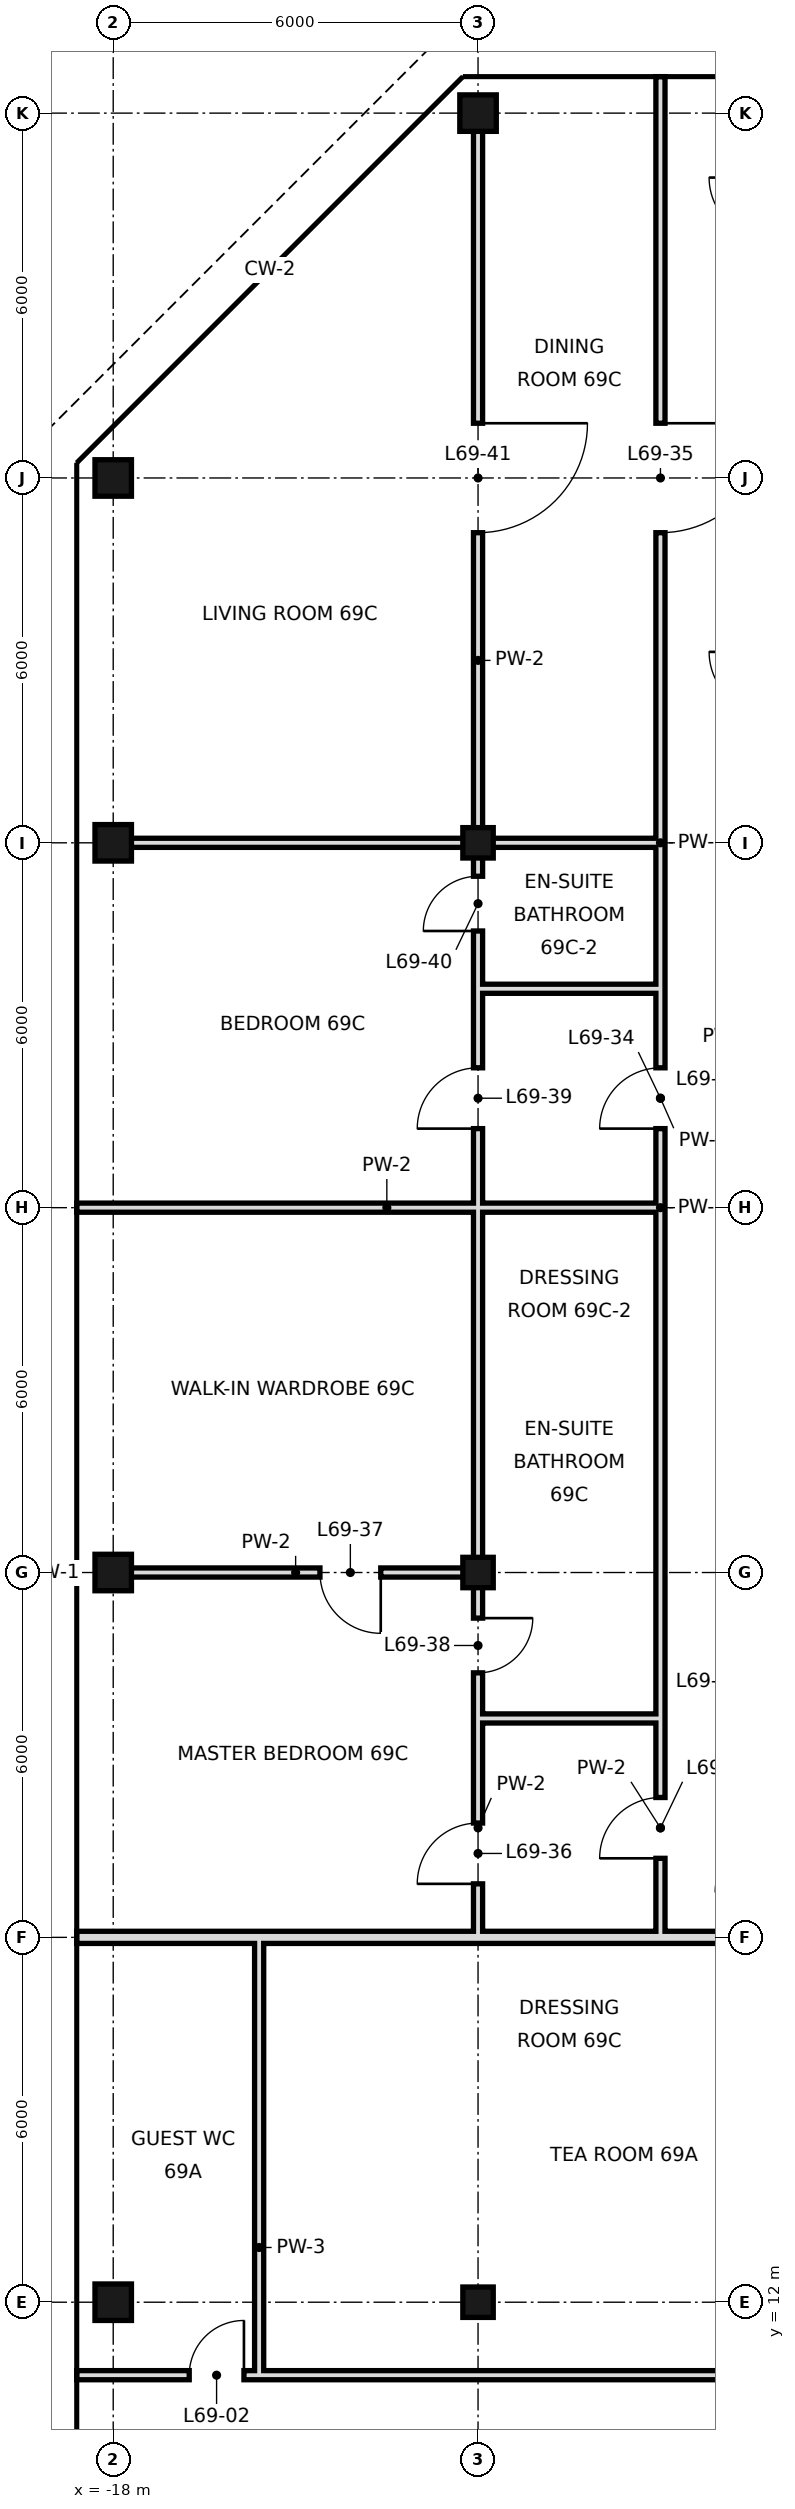
"""IFC4 building model, lengths in metres.
Left out: names, types, materials, properties, quantities, classifications, styles, units other than length and angle.
Written with IfcOpenShell. Run it as: python <this file> out.ifc"""

import sys

from ifc_helpers import new_model, si_unit, direction, frame, frame_2d, origin, origin_2d, place, context, subcontext, project, spatial, rectangle, hollow_rectangle, extrude, element, fill, save


model = new_model("IFC4")
c1 = context("Model", 3, precision=1e-05, world=origin(), true_north=direction((0.0, 1.0)))
c2 = subcontext(c1, "Body", "Model", "MODEL_VIEW")
j1 = project(units=[si_unit("LENGTHUNIT", "METRE"), si_unit("PLANEANGLEUNIT", "RADIAN")], contexts=[c1])
p1 = place(None, origin())
s1 = spatial("IfcSite", under=j1, at=p1, CompositionType="ELEMENT")
p2 = place(p1, origin())
s2 = spatial("IfcBuilding", under=s1, at=p2, CompositionType="ELEMENT")
p3 = place(p2, frame((0.0, 0.0, 294.4)))
s3 = spatial("IfcBuildingStorey", under=s2, at=p3, CompositionType="ELEMENT", Elevation=294.4)
for number, where, z_axis, x_axis in (
    (1, (-18.0, 12.0, 0.0), (0.0, 0.0, 1.0), (1.0, 0.0, 0.0)),
    (2, (-18.0, 24.0, 0.0), (0.0, 0.0, 1.0), (1.0, 0.0, 0.0)),
    (3, (-18.0, 36.0, 0.0), (0.0, 0.0, 1.0), (1.0, 0.0, 0.0)),
    (4, (-18.0, 42.0, 0.0), (0.0, 0.0, 1.0), (1.0, 0.0, 0.0)),
):
    element("IfcColumn", number, at=place(p3, frame(where, z_axis=z_axis, x_axis=x_axis)), inside=s3, PredefinedType="COLUMN", context=c2, shape_type="SweptSolid", body=[
        extrude(hollow_rectangle(XDim=0.6, YDim=0.6, WallThickness=0.028, at=origin_2d()), origin(), (0.0, 0.0, 1.0), 3.6),
    ])
for number, where, z_axis, x_axis in (
    (5, (-12.0, 12.0, 0.0), (0.0, 0.0, 1.0), (1.0, 0.0, 0.0)),
    (6, (-12.0, 24.0, 0.0), (0.0, 0.0, 1.0), (1.0, 0.0, 0.0)),
    (7, (-12.0, 36.0, 0.0), (0.0, 0.0, 1.0), (1.0, 0.0, 0.0)),
):
    element("IfcColumn", number, at=place(p3, frame(where, z_axis=z_axis, x_axis=x_axis)), inside=s3, PredefinedType="COLUMN", context=c2, shape_type="SweptSolid", body=[
        extrude(hollow_rectangle(XDim=0.5, YDim=0.5, WallThickness=0.025, at=origin_2d()), origin(), (0.0, 0.0, 1.0), 3.6),
    ])
p4 = place(p3, frame((-12.0, 48.0, 0.0), z_axis=(0.0, 0.0, 1.0), x_axis=(1.0, 0.0, 0.0)))
e8 = element("IfcColumn", 8, at=p4, inside=s3, PredefinedType="COLUMN", context=c2, shape_type="SweptSolid", body=[
    extrude(hollow_rectangle(XDim=0.6, YDim=0.6, WallThickness=0.028, at=origin_2d()), origin(), (0.0, 0.0, 1.0), 3.6),
])
p5 = place(p3, frame((-12.0, 18.0, 0.0), z_axis=(0.0, 0.0, 1.0), x_axis=(0.0, 1.0, 0.0)))
e9 = element("IfcWall", 9, at=p5, inside=s3, PredefinedType="PARTITIONING", context=c2, shape_type="SweptSolid", body=[
    extrude(rectangle(XDim=3.6, YDim=0.15, at=frame_2d((1.8, 0.0))), origin(), (0.0, 0.0, 1.0), 2.72),
])
p6 = place(p5, frame((0.88, 0.0, 0.0)))
e10 = element("IfcOpeningElement", 10, at=p6, cuts=e9, PredefinedType="OPENING", context=c2, shape_type="SweptSolid", body=[
    extrude(rectangle(XDim=1.0, YDim=2.4, at=frame_2d((0.5, 1.2))), frame((0.0, 0.085, 0.0), z_axis=(0.0, -1.0, 0.0), x_axis=(1.0, 0.0, 0.0)), (0.0, 0.0, 1.0), 0.17),
])
p7 = place(p3, frame((-12.0, 30.0, 0.0), z_axis=(0.0, 0.0, 1.0), x_axis=(0.0, 1.0, 0.0)))
e11 = element("IfcWall", 11, at=p7, inside=s3, PredefinedType="PARTITIONING", context=c2, shape_type="SweptSolid", body=[
    extrude(rectangle(XDim=3.6, YDim=0.15, at=frame_2d((1.8, 0.0))), origin(), (0.0, 0.0, 1.0), 2.72),
])
p8 = place(p7, frame((1.3, 0.0, 0.0)))
e12 = element("IfcOpeningElement", 12, at=p8, cuts=e11, PredefinedType="OPENING", context=c2, shape_type="SweptSolid", body=[
    extrude(rectangle(XDim=1.0, YDim=2.4, at=frame_2d((0.5, 1.2))), frame((0.0, 0.085, 0.0), z_axis=(0.0, -1.0, 0.0), x_axis=(1.0, 0.0, 0.0)), (0.0, 0.0, 1.0), 0.17),
])
p9 = place(p3, frame((-12.0, 36.0, 0.0), z_axis=(0.0, 0.0, 1.0), x_axis=(0.0, 1.0, 0.0)))
e13 = element("IfcWall", 13, at=p9, inside=s3, PredefinedType="PARTITIONING", context=c2, shape_type="SweptSolid", body=[
    extrude(rectangle(XDim=12.0, YDim=0.15, at=frame_2d((6.0, 0.0))), origin(), (0.0, 0.0, 1.0), 2.72),
])
p10 = place(p9, frame((5.1, 0.0, 0.0)))
e14 = element("IfcOpeningElement", 14, at=p10, cuts=e13, PredefinedType="OPENING", context=c2, shape_type="SweptSolid", body=[
    extrude(rectangle(XDim=1.8, YDim=2.4, at=frame_2d((0.9, 1.2))), frame((0.0, 0.085, 0.0), z_axis=(0.0, -1.0, 0.0), x_axis=(1.0, 0.0, 0.0)), (0.0, 0.0, 1.0), 0.17),
])
p11 = place(p3, frame((-12.0, 21.6, 0.0), z_axis=(0.0, 0.0, 1.0), x_axis=(0.0, 1.0, 0.0)))
e15 = element("IfcWall", 15, at=p11, inside=s3, PredefinedType="PARTITIONING", context=c2, shape_type="SweptSolid", body=[
    extrude(rectangle(XDim=8.4, YDim=0.15, at=frame_2d((4.2, 0.0))), origin(), (0.0, 0.0, 1.0), 2.72),
])
p12 = place(p11, frame((0.75, 0.0, 0.0)))
e16 = element("IfcOpeningElement", 16, at=p12, cuts=e15, PredefinedType="OPENING", context=c2, shape_type="SweptSolid", body=[
    extrude(rectangle(XDim=0.9, YDim=2.4, at=frame_2d((0.45, 1.2))), frame((0.0, 0.085, 0.0), z_axis=(0.0, -1.0, 0.0), x_axis=(1.0, 0.0, 0.0)), (0.0, 0.0, 1.0), 0.17),
])
p13 = place(p3, frame((-12.0, 33.6, 0.0), z_axis=(0.0, 0.0, 1.0), x_axis=(0.0, 1.0, 0.0)))
e17 = element("IfcWall", 17, at=p13, inside=s3, PredefinedType="PARTITIONING", context=c2, shape_type="SweptSolid", body=[
    extrude(rectangle(XDim=2.4, YDim=0.15, at=frame_2d((1.2, 0.0))), origin(), (0.0, 0.0, 1.0), 2.72),
])
p14 = place(p13, frame((0.95, 0.0, 0.0)))
e18 = element("IfcOpeningElement", 18, at=p14, cuts=e17, PredefinedType="OPENING", context=c2, shape_type="SweptSolid", body=[
    extrude(rectangle(XDim=0.9, YDim=2.4, at=frame_2d((0.45, 1.2))), frame((0.0, 0.085, 0.0), z_axis=(0.0, -1.0, 0.0), x_axis=(1.0, 0.0, 0.0)), (0.0, 0.0, 1.0), 0.17),
])
p15 = place(p3, frame((-15.6, 10.8, 0.0), z_axis=(0.0, 0.0, 1.0), x_axis=(0.0, 1.0, 0.0)))
e19 = element("IfcWall", 19, at=p15, inside=s3, PredefinedType="PARTITIONING", context=c2, shape_type="SweptSolid", body=[
    extrude(rectangle(XDim=7.2, YDim=0.15, at=frame_2d((3.6, 0.0))), origin(), (0.0, 0.0, 1.0), 3.42),
])
p16 = place(p3, frame((-9.0, 18.0, 0.0), z_axis=(0.0, 0.0, 1.0), x_axis=(0.0, 1.0, 0.0)))
e20 = element("IfcWall", 20, at=p16, inside=s3, PredefinedType="PARTITIONING", context=c2, shape_type="SweptSolid", body=[
    extrude(rectangle(XDim=3.6, YDim=0.15, at=frame_2d((1.8, 0.0))), origin(), (0.0, 0.0, 1.0), 3.42),
])
p17 = place(p16, frame((1.3, 0.0, 0.0)))
e21 = element("IfcOpeningElement", 21, at=p17, cuts=e20, PredefinedType="OPENING", context=c2, shape_type="SweptSolid", body=[
    extrude(rectangle(XDim=1.0, YDim=2.4, at=frame_2d((0.5, 1.2))), frame((0.0, 0.085, 0.0), z_axis=(0.0, -1.0, 0.0), x_axis=(1.0, 0.0, 0.0)), (0.0, 0.0, 1.0), 0.17),
])
p18 = place(p3, frame((-9.0, 30.0, 0.0), z_axis=(0.0, 0.0, 1.0), x_axis=(0.0, 1.0, 0.0)))
e22 = element("IfcWall", 22, at=p18, inside=s3, PredefinedType="PARTITIONING", context=c2, shape_type="SweptSolid", body=[
    extrude(rectangle(XDim=3.6, YDim=0.15, at=frame_2d((1.8, 0.0))), origin(), (0.0, 0.0, 1.0), 3.42),
])
p19 = place(p18, frame((1.3, 0.0, 0.0)))
e23 = element("IfcOpeningElement", 23, at=p19, cuts=e22, PredefinedType="OPENING", context=c2, shape_type="SweptSolid", body=[
    extrude(rectangle(XDim=1.0, YDim=2.4, at=frame_2d((0.5, 1.2))), frame((0.0, 0.085, 0.0), z_axis=(0.0, -1.0, 0.0), x_axis=(1.0, 0.0, 0.0)), (0.0, 0.0, 1.0), 0.17),
])
p20 = place(p3, frame((-9.0, 36.0, 0.0), z_axis=(0.0, 0.0, 1.0), x_axis=(0.0, 1.0, 0.0)))
e24 = element("IfcWall", 24, at=p20, inside=s3, PredefinedType="PARTITIONING", context=c2, shape_type="SweptSolid", body=[
    extrude(rectangle(XDim=12.6, YDim=0.15, at=frame_2d((6.3, 0.0))), origin(), (0.0, 0.0, 1.0), 3.42),
])
p21 = place(p20, frame((5.1, 0.0, 0.0)))
e25 = element("IfcOpeningElement", 25, at=p21, cuts=e24, PredefinedType="OPENING", context=c2, shape_type="SweptSolid", body=[
    extrude(rectangle(XDim=1.8, YDim=2.4, at=frame_2d((0.9, 1.2))), frame((0.0, 0.085, 0.0), z_axis=(0.0, -1.0, 0.0), x_axis=(1.0, 0.0, 0.0)), (0.0, 0.0, 1.0), 0.17),
])
p22 = place(p3, frame((-9.0, 21.6, 0.0), z_axis=(0.0, 0.0, 1.0), x_axis=(0.0, 1.0, 0.0)))
e26 = element("IfcWall", 26, at=p22, inside=s3, PredefinedType="PARTITIONING", context=c2, shape_type="SweptSolid", body=[
    extrude(rectangle(XDim=8.4, YDim=0.15, at=frame_2d((4.2, 0.0))), origin(), (0.0, 0.0, 1.0), 3.42),
])
p23 = place(p3, frame((-9.0, 33.6, 0.0), z_axis=(0.0, 0.0, 1.0), x_axis=(0.0, 1.0, 0.0)))
e27 = element("IfcWall", 27, at=p23, inside=s3, PredefinedType="PARTITIONING", context=c2, shape_type="SweptSolid", body=[
    extrude(rectangle(XDim=2.4, YDim=0.15, at=frame_2d((1.2, 0.0))), origin(), (0.0, 0.0, 1.0), 3.42),
])
p24 = place(p3, frame((-15.6, 10.8, 0.0), z_axis=(0.0, 0.0, 1.0), x_axis=(1.0, 0.0, 0.0)))
e28 = element("IfcWall", 28, at=p24, inside=s3, PredefinedType="PARTITIONING", context=c2, shape_type="SweptSolid", body=[
    extrude(rectangle(XDim=23.4, YDim=0.15, at=frame_2d((11.7, 0.0))), origin(), (0.0, 0.0, 1.0), 3.42),
])
p25 = place(p24, frame((10.75, 0.0, 0.0)))
e29 = element("IfcOpeningElement", 29, at=p25, cuts=e28, PredefinedType="OPENING", context=c2, shape_type="SweptSolid", body=[
    extrude(rectangle(XDim=1.0, YDim=2.4, at=frame_2d((0.5, 1.2))), frame((0.0, 0.085, 0.0), z_axis=(0.0, -1.0, 0.0), x_axis=(1.0, 0.0, 0.0)), (0.0, 0.0, 1.0), 0.17),
])
p26 = place(p24, frame((17.2, 0.0, 0.0)))
e30 = element("IfcOpeningElement", 30, at=p26, cuts=e28, PredefinedType="OPENING", context=c2, shape_type="SweptSolid", body=[
    extrude(rectangle(XDim=1.0, YDim=2.4, at=frame_2d((0.5, 1.2))), frame((0.0, 0.085, 0.0), z_axis=(0.0, -1.0, 0.0), x_axis=(1.0, 0.0, 0.0)), (0.0, 0.0, 1.0), 0.17),
])
p27 = place(p3, frame((-18.6, 10.8, 0.0), z_axis=(0.0, 0.0, 1.0), x_axis=(1.0, 0.0, 0.0)))
e31 = element("IfcWall", 31, at=p27, inside=s3, PredefinedType="PARTITIONING", context=c2, shape_type="SweptSolid", body=[
    extrude(rectangle(XDim=3.0, YDim=0.15, at=frame_2d((1.5, 0.0))), origin(), (0.0, 0.0, 1.0), 3.42),
])
p28 = place(p27, frame((1.85, 0.0, 0.0)))
e32 = element("IfcOpeningElement", 32, at=p28, cuts=e31, PredefinedType="OPENING", context=c2, shape_type="SweptSolid", body=[
    extrude(rectangle(XDim=0.9, YDim=2.4, at=frame_2d((0.45, 1.2))), frame((0.0, 0.085, 0.0), z_axis=(0.0, -1.0, 0.0), x_axis=(1.0, 0.0, 0.0)), (0.0, 0.0, 1.0), 0.17),
])
p29 = place(p3, frame((-18.6, 18.0, 0.0), z_axis=(0.0, 0.0, 1.0), x_axis=(1.0, 0.0, 0.0)))
e33 = element("IfcWall", 33, at=p29, inside=s3, PredefinedType="SOLIDWALL", context=c2, shape_type="SweptSolid", body=[
    extrude(rectangle(XDim=21.7, YDim=0.2, at=frame_2d((10.85, 0.0))), origin(), (0.0, 0.0, 1.0), 2.72),
])
p30 = place(p3, frame((-12.0, 21.6, 0.0), z_axis=(0.0, 0.0, 1.0), x_axis=(1.0, 0.0, 0.0)))
e34 = element("IfcWall", 34, at=p30, inside=s3, PredefinedType="PARTITIONING", context=c2, shape_type="SweptSolid", body=[
    extrude(rectangle(XDim=3.0, YDim=0.15, at=frame_2d((1.5, 0.0))), origin(), (0.0, 0.0, 1.0), 3.42),
])
p31 = place(p3, frame((-18.0, 24.0, 0.0), z_axis=(0.0, 0.0, 1.0), x_axis=(1.0, 0.0, 0.0)))
e35 = element("IfcWall", 35, at=p31, inside=s3, PredefinedType="PARTITIONING", context=c2, shape_type="SweptSolid", body=[
    extrude(rectangle(XDim=6.0, YDim=0.15, at=frame_2d((3.0, 0.0))), origin(), (0.0, 0.0, 1.0), 2.97),
])
p32 = place(p31, frame((3.4, 0.0, 0.0)))
e36 = element("IfcOpeningElement", 36, at=p32, cuts=e35, PredefinedType="OPENING", context=c2, shape_type="SweptSolid", body=[
    extrude(rectangle(XDim=1.0, YDim=2.4, at=frame_2d((0.5, 1.2))), frame((0.0, 0.085, 0.0), z_axis=(0.0, -1.0, 0.0), x_axis=(1.0, 0.0, 0.0)), (0.0, 0.0, 1.0), 0.17),
])
p33 = place(p3, frame((-18.6, 30.0, 0.0), z_axis=(0.0, 0.0, 1.0), x_axis=(1.0, 0.0, 0.0)))
e37 = element("IfcWall", 37, at=p33, inside=s3, PredefinedType="PARTITIONING", context=c2, shape_type="SweptSolid", body=[
    extrude(rectangle(XDim=6.6, YDim=0.15, at=frame_2d((3.3, 0.0))), origin(), (0.0, 0.0, 1.0), 2.97),
])
p34 = place(p3, frame((-12.0, 30.0, 0.0), z_axis=(0.0, 0.0, 1.0), x_axis=(1.0, 0.0, 0.0)))
e38 = element("IfcWall", 38, at=p34, inside=s3, PredefinedType="PARTITIONING", context=c2, shape_type="SweptSolid", body=[
    extrude(rectangle(XDim=3.0, YDim=0.15, at=frame_2d((1.5, 0.0))), origin(), (0.0, 0.0, 1.0), 2.72),
])
p35 = place(p3, frame((-12.0, 33.6, 0.0), z_axis=(0.0, 0.0, 1.0), x_axis=(1.0, 0.0, 0.0)))
e39 = element("IfcWall", 39, at=p35, inside=s3, PredefinedType="PARTITIONING", context=c2, shape_type="SweptSolid", body=[
    extrude(rectangle(XDim=3.0, YDim=0.15, at=frame_2d((1.5, 0.0))), origin(), (0.0, 0.0, 1.0), 3.42),
])
p36 = place(p3, frame((-18.0, 36.0, 0.0), z_axis=(0.0, 0.0, 1.0), x_axis=(1.0, 0.0, 0.0)))
e40 = element("IfcWall", 40, at=p36, inside=s3, PredefinedType="PARTITIONING", context=c2, shape_type="SweptSolid", body=[
    extrude(rectangle(XDim=6.0, YDim=0.15, at=frame_2d((3.0, 0.0))), origin(), (0.0, 0.0, 1.0), 2.97),
])
p37 = place(p3, frame((-12.0, 36.0, 0.0), z_axis=(0.0, 0.0, 1.0), x_axis=(1.0, 0.0, 0.0)))
e41 = element("IfcWall", 41, at=p37, inside=s3, PredefinedType="PARTITIONING", context=c2, shape_type="SweptSolid", body=[
    extrude(rectangle(XDim=3.0, YDim=0.15, at=frame_2d((1.5, 0.0))), origin(), (0.0, 0.0, 1.0), 2.72),
])
p38 = place(p28, frame((0.9, 0.0, 0.0), z_axis=(0.0, 0.0, 1.0), x_axis=(-1.0, 0.0, 0.0)))
e42 = element("IfcDoor", 42, at=p38, inside=s3, OperationType="SINGLE_SWING_LEFT", PredefinedType="DOOR", context=c2, shape_type="SweptSolid", body=[
    extrude(rectangle(XDim=0.9, YDim=2.4, at=frame_2d((0.45, 1.2))), frame((0.0, 0.025, 0.0), z_axis=(0.0, -1.0, 0.0), x_axis=(1.0, 0.0, 0.0)), (0.0, 0.0, 1.0), 0.05),
])
fill(e32, e42)
p39 = place(p17, origin())
e43 = element("IfcDoor", 43, at=p39, inside=s3, OperationType="SINGLE_SWING_LEFT", PredefinedType="DOOR", context=c2, shape_type="SweptSolid", body=[
    extrude(rectangle(XDim=1.0, YDim=2.4, at=frame_2d((0.5, 1.2))), frame((0.0, 0.025, 0.0), z_axis=(0.0, -1.0, 0.0), x_axis=(1.0, 0.0, 0.0)), (0.0, 0.0, 1.0), 0.05),
])
fill(e21, e43)
p40 = place(p19, origin())
e44 = element("IfcDoor", 44, at=p40, inside=s3, OperationType="SINGLE_SWING_LEFT", PredefinedType="DOOR", context=c2, shape_type="SweptSolid", body=[
    extrude(rectangle(XDim=1.0, YDim=2.4, at=frame_2d((0.5, 1.2))), frame((0.0, 0.025, 0.0), z_axis=(0.0, -1.0, 0.0), x_axis=(1.0, 0.0, 0.0)), (0.0, 0.0, 1.0), 0.05),
])
fill(e23, e44)
p41 = place(p21, origin())
e45 = element("IfcDoor", 45, at=p41, inside=s3, OperationType="SINGLE_SWING_RIGHT", PredefinedType="DOOR", context=c2, shape_type="SweptSolid", body=[
    extrude(rectangle(XDim=1.8, YDim=2.4, at=frame_2d((0.9, 1.2))), frame((0.0, 0.025, 0.0), z_axis=(0.0, -1.0, 0.0), x_axis=(1.0, 0.0, 0.0)), (0.0, 0.0, 1.0), 0.05),
])
fill(e25, e45)
p42 = place(p6, origin())
e46 = element("IfcDoor", 46, at=p42, inside=s3, OperationType="SINGLE_SWING_LEFT", PredefinedType="DOOR", context=c2, shape_type="SweptSolid", body=[
    extrude(rectangle(XDim=1.0, YDim=2.4, at=frame_2d((0.5, 1.2))), frame((0.0, 0.025, 0.0), z_axis=(0.0, -1.0, 0.0), x_axis=(1.0, 0.0, 0.0)), (0.0, 0.0, 1.0), 0.05),
])
fill(e10, e46)
p43 = place(p32, origin())
e47 = element("IfcDoor", 47, at=p43, inside=s3, OperationType="SINGLE_SWING_RIGHT", PredefinedType="DOOR", context=c2, shape_type="SweptSolid", body=[
    extrude(rectangle(XDim=1.0, YDim=2.4, at=frame_2d((0.5, 1.2))), frame((0.0, 0.025, 0.0), z_axis=(0.0, -1.0, 0.0), x_axis=(1.0, 0.0, 0.0)), (0.0, 0.0, 1.0), 0.05),
])
fill(e36, e47)
p44 = place(p12, origin())
e48 = element("IfcDoor", 48, at=p44, inside=s3, OperationType="SINGLE_SWING_RIGHT", PredefinedType="DOOR", context=c2, shape_type="SweptSolid", body=[
    extrude(rectangle(XDim=0.9, YDim=2.4, at=frame_2d((0.45, 1.2))), frame((0.0, 0.025, 0.0), z_axis=(0.0, -1.0, 0.0), x_axis=(1.0, 0.0, 0.0)), (0.0, 0.0, 1.0), 0.05),
])
fill(e16, e48)
p45 = place(p8, origin())
e49 = element("IfcDoor", 49, at=p45, inside=s3, OperationType="SINGLE_SWING_LEFT", PredefinedType="DOOR", context=c2, shape_type="SweptSolid", body=[
    extrude(rectangle(XDim=1.0, YDim=2.4, at=frame_2d((0.5, 1.2))), frame((0.0, 0.025, 0.0), z_axis=(0.0, -1.0, 0.0), x_axis=(1.0, 0.0, 0.0)), (0.0, 0.0, 1.0), 0.05),
])
fill(e12, e49)
p46 = place(p14, origin())
e50 = element("IfcDoor", 50, at=p46, inside=s3, OperationType="SINGLE_SWING_LEFT", PredefinedType="DOOR", context=c2, shape_type="SweptSolid", body=[
    extrude(rectangle(XDim=0.9, YDim=2.4, at=frame_2d((0.45, 1.2))), frame((0.0, 0.025, 0.0), z_axis=(0.0, -1.0, 0.0), x_axis=(1.0, 0.0, 0.0)), (0.0, 0.0, 1.0), 0.05),
])
fill(e18, e50)
p47 = place(p10, origin())
e51 = element("IfcDoor", 51, at=p47, inside=s3, OperationType="SINGLE_SWING_RIGHT", PredefinedType="DOOR", context=c2, shape_type="SweptSolid", body=[
    extrude(rectangle(XDim=1.8, YDim=2.4, at=frame_2d((0.9, 1.2))), frame((0.0, 0.025, 0.0), z_axis=(0.0, -1.0, 0.0), x_axis=(1.0, 0.0, 0.0)), (0.0, 0.0, 1.0), 0.05),
])
fill(e14, e51)
save(model, sys.argv[1])
